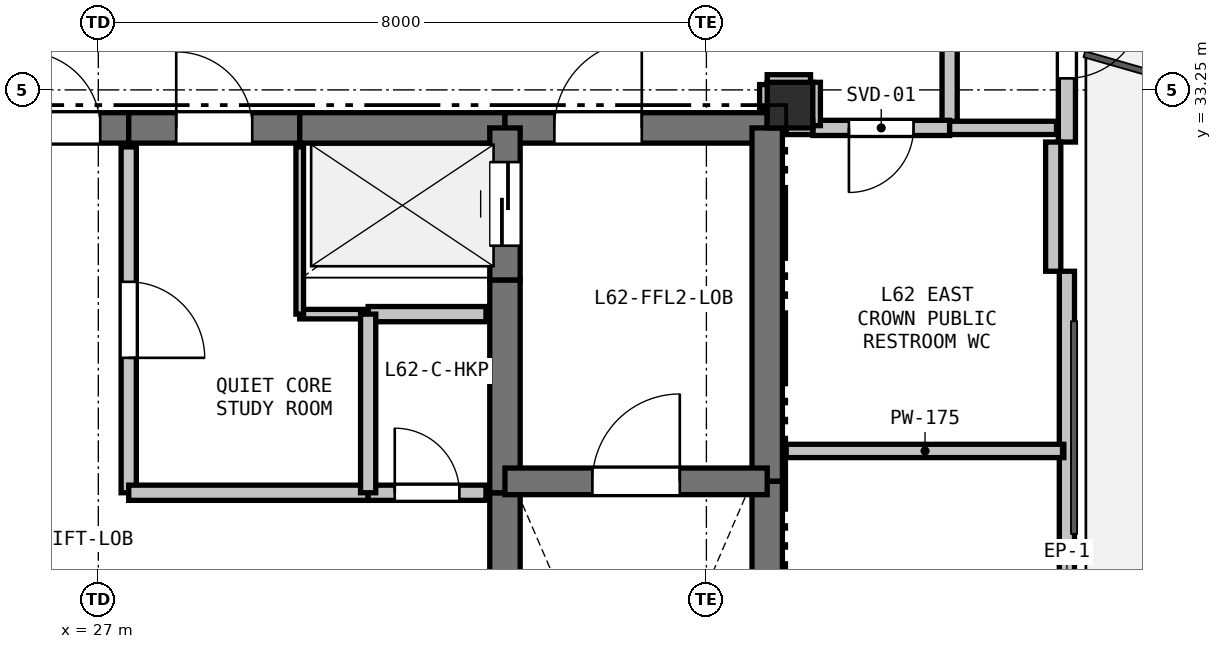
"""IFC4 building model, lengths in metres.
Left out: names, types, materials, properties, quantities, classifications, styles, units other than length and angle.
Written with IfcOpenShell. Run it as: python <this file> out.ifc"""

import sys

from ifc_helpers import new_model, si_unit, direction, frame, frame_2d, origin, origin_2d, place, context, subcontext, project, spatial, rectangle, extrude, element, fill, save


model = new_model("IFC4")
c1 = context("Model", 3, precision=1e-05, world=origin(), true_north=direction((0.0, 1.0)))
c2 = subcontext(c1, "Body", "Model", "MODEL_VIEW")
j1 = project(units=[si_unit("LENGTHUNIT", "METRE"), si_unit("PLANEANGLEUNIT", "RADIAN")], contexts=[c1])
p1 = place(None, origin())
s1 = spatial("IfcSite", under=j1, at=p1, CompositionType="ELEMENT")
p2 = place(p1, origin())
s2 = spatial("IfcBuilding", under=s1, at=p2, CompositionType="ELEMENT")
p3 = place(p2, frame((0.0, 0.0, 223.2)))
s3 = spatial("IfcBuildingStorey", under=s2, at=p3, CompositionType="ELEMENT", Elevation=223.2)
p4 = place(p3, frame((36.1, 33.05, 0.0), z_axis=(0.0, 0.0, 1.0), x_axis=(1.0, 0.0, 0.0)))
e1 = element("IfcColumn", 1, at=p4, inside=s3, PredefinedType="COLUMN", context=c2, shape_type="SweptSolid", body=[
    extrude(rectangle(XDim=0.6, YDim=0.6, at=origin_2d()), origin(), (0.0, 0.0, 1.0), 3.3),
])
p5 = place(p3, frame((39.743, 41.492, 0.0), z_axis=(0.0, 0.0, 1.0), x_axis=(0.0, -1.0, 0.0)))
e2 = element("IfcWall", 2, at=p5, inside=s3, PredefinedType="SOLIDWALL", context=c2, shape_type="SweptSolid", body=[
    extrude(rectangle(XDim=8.928, YDim=0.225, at=frame_2d((4.464, 0.0))), origin(), (0.0, 0.0, 1.0), 2.7),
])
p6 = place(p5, frame((7.09, 0.0, 0.0)))
e3 = element("IfcOpeningElement", 3, at=p6, cuts=e2, PredefinedType="OPENING", context=c2, shape_type="SweptSolid", body=[
    extrude(rectangle(XDim=1.0, YDim=2.1, at=frame_2d((0.5, 1.05))), frame((0.0, 0.123, 0.0), z_axis=(0.0, -1.0, 0.0), x_axis=(1.0, 0.0, 0.0)), (0.0, 0.0, 1.0), 0.245),
])
p7 = place(p5, frame((1.406, 0.0, 0.9)))
e4 = element("IfcOpeningElement", 4, at=p7, cuts=e2, PredefinedType="OPENING", context=c2, shape_type="SweptSolid", body=[
    extrude(rectangle(XDim=1.2, YDim=1.4, at=frame_2d((0.6, 0.7))), frame((0.0, 0.123, 0.0), z_axis=(0.0, -1.0, 0.0), x_axis=(1.0, 0.0, 0.0)), (0.0, 0.0, 1.0), 0.245),
])
p8 = place(p3, frame((39.743, 30.864, 0.0), z_axis=(0.0, 0.0, 1.0), x_axis=(0.0, -1.0, 0.0)))
e5 = element("IfcWall", 5, at=p8, inside=s3, PredefinedType="PARAPET", context=c2, shape_type="SweptSolid", body=[
    extrude(rectangle(XDim=8.228, YDim=0.2, at=frame_2d((4.114, 0.0))), origin(), (0.0, 0.0, 1.0), 0.2),
])
p9 = place(p3, frame((39.563, 32.564, 0.0), z_axis=(0.0, 0.0, 1.0), x_axis=(0.0, -1.0, 0.0)))
e6 = element("IfcWall", 6, at=p9, inside=s3, PredefinedType="PARAPET", context=c2, shape_type="SweptSolid", body=[
    extrude(rectangle(XDim=1.7, YDim=0.2, at=frame_2d((0.85, 0.0))), origin(), (0.0, 0.0, 1.0), 2.7),
])
p10 = place(p3, frame((25.65, 32.75, 0.0), z_axis=(0.0, 0.0, 1.0), x_axis=(1.0, 0.0, 0.0)))
e7 = element("IfcWall", 7, at=p10, inside=s3, PredefinedType="SHEAR", context=c2, shape_type="SweptSolid", body=[
    extrude(rectangle(XDim=1.75, YDim=0.4, at=frame_2d((0.875, 0.0))), origin(), (0.0, 0.0, 1.0), 3.08),
])
p11 = place(p10, frame((0.375, 0.0, 0.0)))
e8 = element("IfcOpeningElement", 8, at=p11, cuts=e7, PredefinedType="OPENING", context=c2, shape_type="SweptSolid", body=[
    extrude(rectangle(XDim=1.0, YDim=2.15, at=frame_2d((0.5, 1.075))), frame((0.0, 0.21, 0.0), z_axis=(0.0, -1.0, 0.0), x_axis=(1.0, 0.0, 0.0)), (0.0, 0.0, 1.0), 0.42),
])
p12 = place(p3, frame((27.4, 32.75, 0.0), z_axis=(0.0, 0.0, 1.0), x_axis=(1.0, 0.0, 0.0)))
e9 = element("IfcWall", 9, at=p12, inside=s3, PredefinedType="SHEAR", context=c2, shape_type="SweptSolid", body=[
    extrude(rectangle(XDim=2.25, YDim=0.4, at=frame_2d((1.125, 0.0))), origin(), (0.0, 0.0, 1.0), 3.08),
])
p13 = place(p12, frame((0.625, 0.0, 0.0)))
e10 = element("IfcOpeningElement", 10, at=p13, cuts=e9, PredefinedType="OPENING", context=c2, shape_type="SweptSolid", body=[
    extrude(rectangle(XDim=1.0, YDim=2.15, at=frame_2d((0.5, 1.075))), frame((0.0, 0.21, 0.0), z_axis=(0.0, -1.0, 0.0), x_axis=(1.0, 0.0, 0.0)), (0.0, 0.0, 1.0), 0.42),
])
p14 = place(p3, frame((29.65, 32.75, 0.0), z_axis=(0.0, 0.0, 1.0), x_axis=(1.0, 0.0, 0.0)))
e11 = element("IfcWall", 11, at=p14, inside=s3, PredefinedType="SHEAR", context=c2, shape_type="SweptSolid", body=[
    extrude(rectangle(XDim=2.7, YDim=0.4, at=frame_2d((1.35, 0.0))), origin(), (0.0, 0.0, 1.0), 3.08),
])
p15 = place(p3, frame((32.35, 32.75, 0.0), z_axis=(0.0, 0.0, 1.0), x_axis=(1.0, 0.0, 0.0)))
e12 = element("IfcWall", 12, at=p15, inside=s3, PredefinedType="SHEAR", context=c2, shape_type="SweptSolid", body=[
    extrude(rectangle(XDim=3.45, YDim=0.4, at=frame_2d((1.725, 0.0))), origin(), (0.0, 0.0, 1.0), 3.08),
])
p16 = place(p15, frame((0.65, 0.0, 0.0)))
e13 = element("IfcOpeningElement", 13, at=p16, cuts=e12, PredefinedType="OPENING", context=c2, shape_type="SweptSolid", body=[
    extrude(rectangle(XDim=1.15, YDim=2.15, at=frame_2d((0.575, 1.075))), frame((0.0, 0.21, 0.0), z_axis=(0.0, -1.0, 0.0), x_axis=(1.0, 0.0, 0.0)), (0.0, 0.0, 1.0), 0.42),
])
p17 = place(p3, frame((35.8, 32.75, 0.0), z_axis=(0.0, 0.0, 1.0), x_axis=(0.0, -1.0, 0.0)))
e14 = element("IfcWall", 14, at=p17, inside=s3, PredefinedType="SHEAR", context=c2, shape_type="SweptSolid", body=[
    extrude(rectangle(XDim=4.65, YDim=0.4, at=frame_2d((2.325, 0.0))), origin(), (0.0, 0.0, 1.0), 3.08),
])
p18 = place(p3, frame((35.8, 28.1, 0.0), z_axis=(0.0, 0.0, 1.0), x_axis=(0.0, -1.0, 0.0)))
e15 = element("IfcWall", 15, at=p18, inside=s3, PredefinedType="SHEAR", context=c2, shape_type="SweptSolid", body=[
    extrude(rectangle(XDim=7.35, YDim=0.4, at=frame_2d((3.675, 0.0))), origin(), (0.0, 0.0, 1.0), 3.08),
])
p19 = place(p3, frame((32.35, 25.55, 0.0), z_axis=(0.0, 0.0, 1.0), x_axis=(0.0, 1.0, 0.0)))
e16 = element("IfcWall", 16, at=p19, inside=s3, PredefinedType="SHEAR", context=c2, shape_type="SweptSolid", body=[
    extrude(rectangle(XDim=2.4, YDim=0.4, at=frame_2d((1.2, 0.0))), origin(), (0.0, 0.0, 1.0), 3.08),
])
p20 = place(p3, frame((32.35, 27.95, 0.0), z_axis=(0.0, 0.0, 1.0), x_axis=(0.0, 1.0, 0.0)))
e17 = element("IfcWall", 17, at=p20, inside=s3, PredefinedType="SHEAR", context=c2, shape_type="SweptSolid", body=[
    extrude(rectangle(XDim=2.8, YDim=0.4, at=frame_2d((1.4, 0.0))), origin(), (0.0, 0.0, 1.0), 3.08),
])
p21 = place(p3, frame((32.35, 30.75, 0.0), z_axis=(0.0, 0.0, 1.0), x_axis=(0.0, 1.0, 0.0)))
e18 = element("IfcWall", 18, at=p21, inside=s3, PredefinedType="SHEAR", context=c2, shape_type="SweptSolid", body=[
    extrude(rectangle(XDim=2.0, YDim=0.4, at=frame_2d((1.0, 0.0))), origin(), (0.0, 0.0, 1.0), 3.08),
])
p22 = place(p21, frame((0.45, 0.0, 0.0)))
e19 = element("IfcOpeningElement", 19, at=p22, cuts=e18, PredefinedType="OPENING", context=c2, shape_type="SweptSolid", body=[
    extrude(rectangle(XDim=1.1, YDim=2.15, at=frame_2d((0.55, 1.075))), frame((0.0, 0.21, 0.0), z_axis=(0.0, -1.0, 0.0), x_axis=(1.0, 0.0, 0.0)), (0.0, 0.0, 1.0), 0.42),
])
p23 = place(p3, frame((32.35, 28.1, 0.0), z_axis=(0.0, 0.0, 1.0), x_axis=(1.0, 0.0, 0.0)))
e20 = element("IfcWall", 20, at=p23, inside=s3, PredefinedType="SHEAR", context=c2, shape_type="SweptSolid", body=[
    extrude(rectangle(XDim=3.45, YDim=0.35, at=frame_2d((1.725, 0.0))), origin(), (0.0, 0.0, 1.0), 3.08),
])
p24 = place(p23, frame((1.15, 0.0, 0.0)))
e21 = element("IfcOpeningElement", 21, at=p24, cuts=e20, PredefinedType="OPENING", context=c2, shape_type="SweptSolid", body=[
    extrude(rectangle(XDim=1.15, YDim=2.15, at=frame_2d((0.575, 1.075))), frame((0.0, 0.185, 0.0), z_axis=(0.0, -1.0, 0.0), x_axis=(1.0, 0.0, 0.0)), (0.0, 0.0, 1.0), 0.37),
])
p25 = place(p3, frame((32.1, 30.3, 0.0), z_axis=(0.0, 0.0, 1.0), x_axis=(-1.0, 0.0, 0.0)))
e22 = element("IfcWall", 22, at=p25, inside=s3, PredefinedType="PARTITIONING", context=c2, shape_type="SweptSolid", body=[
    extrude(rectangle(XDim=1.55, YDim=0.2, at=frame_2d((0.775, 0.0))), origin(), (0.0, 0.0, 1.0), 3.08),
])
p26 = place(p3, frame((30.55, 30.3, 0.0), z_axis=(0.0, 0.0, 1.0), x_axis=(-1.0, 0.0, 0.0)))
e23 = element("IfcWall", 23, at=p26, inside=s3, PredefinedType="PARTITIONING", context=c2, shape_type="SweptSolid", body=[
    extrude(rectangle(XDim=0.9, YDim=0.125, at=frame_2d((0.45, 0.0))), origin(), (0.0, 0.0, 1.0), 3.08),
])
p27 = place(p3, frame((29.65, 30.3, 0.0), z_axis=(0.0, 0.0, 1.0), x_axis=(0.0, 1.0, 0.0)))
e24 = element("IfcWall", 24, at=p27, inside=s3, PredefinedType="PARTITIONING", context=c2, shape_type="SweptSolid", body=[
    extrude(rectangle(XDim=2.2, YDim=0.1, at=frame_2d((1.1, 0.0))), origin(), (0.0, 0.0, 1.0), 3.08),
])
p28 = place(p3, frame((27.4, 32.5, 0.0), z_axis=(0.0, 0.0, 1.0), x_axis=(0.0, -1.0, 0.0)))
e25 = element("IfcWall", 25, at=p28, inside=s3, PredefinedType="PARTITIONING", context=c2, shape_type="SweptSolid", body=[
    extrude(rectangle(XDim=4.55, YDim=0.2, at=frame_2d((2.275, 0.0))), origin(), (0.0, 0.0, 1.0), 3.08),
])
p29 = place(p28, frame((1.775, 0.0, 0.0)))
e26 = element("IfcOpeningElement", 26, at=p29, cuts=e25, PredefinedType="OPENING", context=c2, shape_type="SweptSolid", body=[
    extrude(rectangle(XDim=1.0, YDim=2.15, at=frame_2d((0.5, 1.075))), frame((0.0, 0.11, 0.0), z_axis=(0.0, -1.0, 0.0), x_axis=(1.0, 0.0, 0.0)), (0.0, 0.0, 1.0), 0.22),
])
p30 = place(p3, frame((27.4, 27.95, 0.0), z_axis=(0.0, 0.0, 1.0), x_axis=(1.0, 0.0, 0.0)))
e27 = element("IfcWall", 27, at=p30, inside=s3, PredefinedType="PARTITIONING", context=c2, shape_type="SweptSolid", body=[
    extrude(rectangle(XDim=3.15, YDim=0.2, at=frame_2d((1.575, 0.0))), origin(), (0.0, 0.0, 1.0), 3.08),
])
p31 = place(p3, frame((30.55, 27.95, 0.0), z_axis=(0.0, 0.0, 1.0), x_axis=(1.0, 0.0, 0.0)))
e28 = element("IfcWall", 28, at=p31, inside=s3, PredefinedType="PARTITIONING", context=c2, shape_type="SweptSolid", body=[
    extrude(rectangle(XDim=1.55, YDim=0.2, at=frame_2d((0.775, 0.0))), origin(), (0.0, 0.0, 1.0), 3.08),
])
p32 = place(p31, frame((0.35, 0.0, 0.0)))
e29 = element("IfcOpeningElement", 29, at=p32, cuts=e28, PredefinedType="OPENING", context=c2, shape_type="SweptSolid", body=[
    extrude(rectangle(XDim=0.85, YDim=2.1, at=frame_2d((0.425, 1.05))), frame((0.0, 0.11, 0.0), z_axis=(0.0, -1.0, 0.0), x_axis=(1.0, 0.0, 0.0)), (0.0, 0.0, 1.0), 0.22),
])
p33 = place(p3, frame((38.2, 35.2, 0.0), z_axis=(0.0, 0.0, 1.0), x_axis=(0.0, -1.0, 0.0)))
e30 = element("IfcWall", 30, at=p33, inside=s3, PredefinedType="PARTITIONING", context=c2, shape_type="SweptSolid", body=[
    extrude(rectangle(XDim=2.45, YDim=0.2, at=frame_2d((1.225, 0.0))), origin(), (0.0, 0.0, 1.0), 3.08),
])
p34 = place(p3, frame((38.2, 32.75, 0.0), z_axis=(0.0, 0.0, 1.0), x_axis=(-1.0, 0.0, 0.0)))
e31 = element("IfcWall", 31, at=p34, inside=s3, PredefinedType="PARTITIONING", context=c2, shape_type="SweptSolid", body=[
    extrude(rectangle(XDim=1.8, YDim=0.2, at=frame_2d((0.9, 0.0))), origin(), (0.0, 0.0, 1.0), 3.08),
])
p35 = place(p34, frame((0.475, 0.0, 0.0)))
e32 = element("IfcOpeningElement", 32, at=p35, cuts=e31, PredefinedType="OPENING", context=c2, shape_type="SweptSolid", body=[
    extrude(rectangle(XDim=0.85, YDim=2.1, at=frame_2d((0.425, 1.05))), frame((0.0, 0.11, 0.0), z_axis=(0.0, -1.0, 0.0), x_axis=(1.0, 0.0, 0.0)), (0.0, 0.0, 1.0), 0.22),
])
for number, where, z_axis, x_axis in (
    (33, (36.4, 32.78, 0.0), (0.0, 0.0, 1.0), (0.0, 1.0, 0.0)),
    (34, (36.37, 33.35, 0.0), (0.0, 0.0, 1.0), (-1.0, 0.0, 0.0)),
):
    element("IfcWall", number, at=place(p3, frame(where, z_axis=z_axis, x_axis=x_axis)), inside=s3, PredefinedType="PARTITIONING", context=c2, shape_type="SweptSolid", body=[
        extrude(rectangle(XDim=0.57, YDim=0.2, at=frame_2d((0.285, 0.0))), origin(), (0.0, 0.0, 1.0), 2.528),
    ])
p36 = place(p3, frame((35.8, 33.32, 0.0), z_axis=(0.0, 0.0, 1.0), x_axis=(0.0, -1.0, 0.0)))
e35 = element("IfcWall", 35, at=p36, inside=s3, PredefinedType="PARTITIONING", context=c2, shape_type="SweptSolid", body=[
    extrude(rectangle(XDim=0.32, YDim=0.2, at=frame_2d((0.16, 0.0))), origin(), (0.0, 0.0, 1.0), 2.605),
])
p37 = place(p3, frame((36.05, 32.75, 0.0), z_axis=(0.0, 0.0, 1.0), x_axis=(1.0, 0.0, 0.0)))
e36 = element("IfcWall", 36, at=p37, inside=s3, PredefinedType="PLUMBINGWALL", context=c2, shape_type="SweptSolid", body=[
    extrude(rectangle(XDim=0.35, YDim=0.175, at=frame_2d((0.175, 0.0))), origin(), (0.0, 0.0, 1.0), 2.605),
])
p38 = place(p3, frame((38.2, 32.75, 0.0), z_axis=(0.0, 0.0, 1.0), x_axis=(1.0, 0.0, 0.0)))
e37 = element("IfcWall", 37, at=p38, inside=s3, PredefinedType="PLUMBINGWALL", context=c2, shape_type="SweptSolid", body=[
    extrude(rectangle(XDim=1.406, YDim=0.175, at=frame_2d((0.703, 0.0))), origin(), (0.0, 0.0, 1.0), 2.365),
])
p39 = place(p3, frame((39.703, 28.5, 0.0), z_axis=(0.0, 0.0, 1.0), x_axis=(-1.0, 0.0, 0.0)))
e38 = element("IfcWall", 38, at=p39, inside=s3, PredefinedType="PLUMBINGWALL", context=c2, shape_type="SweptSolid", body=[
    extrude(rectangle(XDim=3.653, YDim=0.175, at=frame_2d((1.826, 0.0))), origin(), (0.0, 0.0, 1.0), 2.365),
])
p40 = place(p3, frame((30.55, 30.3, 0.0), z_axis=(0.0, 0.0, 1.0), x_axis=(0.0, -1.0, 0.0)))
e39 = element("IfcWall", 39, at=p40, inside=s3, PredefinedType="PARTITIONING", context=c2, shape_type="SweptSolid", body=[
    extrude(rectangle(XDim=2.35, YDim=0.2, at=frame_2d((1.175, 0.0))), origin(), (0.0, 0.0, 1.0), 3.08),
])
p41 = place(p6, origin())
e40 = element("IfcDoor", 40, at=p41, inside=s3, OperationType="SINGLE_SWING_LEFT", PredefinedType="DOOR", context=c2, shape_type="SweptSolid", body=[
    extrude(rectangle(XDim=1.0, YDim=2.1, at=frame_2d((0.5, 1.05))), frame((0.0, 0.025, 0.0), z_axis=(0.0, -1.0, 0.0), x_axis=(1.0, 0.0, 0.0)), (0.0, 0.0, 1.0), 0.05),
])
fill(e3, e40)
p42 = place(p11, origin())
e41 = element("IfcDoor", 41, at=p42, inside=s3, OperationType="SINGLE_SWING_LEFT", PredefinedType="DOOR", context=c2, shape_type="SweptSolid", body=[
    extrude(rectangle(XDim=1.0, YDim=2.15, at=frame_2d((0.5, 1.075))), frame((0.0, 0.025, 0.0), z_axis=(0.0, -1.0, 0.0), x_axis=(1.0, 0.0, 0.0)), (0.0, 0.0, 1.0), 0.05),
])
fill(e8, e41)
p43 = place(p22, origin())
e42 = element("IfcDoor", 42, at=p43, inside=s3, OperationType="SLIDING_TO_LEFT", PredefinedType="DOOR", context=c2, shape_type="SweptSolid", body=[
    extrude(rectangle(XDim=1.1, YDim=2.15, at=frame_2d((0.55, 1.075))), frame((0.0, 0.025, 0.0), z_axis=(0.0, -1.0, 0.0), x_axis=(1.0, 0.0, 0.0)), (0.0, 0.0, 1.0), 0.05),
])
fill(e19, e42)
p44 = place(p24, origin())
e43 = element("IfcDoor", 43, at=p44, inside=s3, OperationType="SINGLE_SWING_RIGHT", PredefinedType="DOOR", context=c2, shape_type="SweptSolid", body=[
    extrude(rectangle(XDim=1.15, YDim=2.15, at=frame_2d((0.575, 1.075))), frame((0.0, 0.025, 0.0), z_axis=(0.0, -1.0, 0.0), x_axis=(1.0, 0.0, 0.0)), (0.0, 0.0, 1.0), 0.05),
])
fill(e21, e43)
p45 = place(p16, origin())
e44 = element("IfcDoor", 44, at=p45, inside=s3, OperationType="SINGLE_SWING_RIGHT", PredefinedType="DOOR", context=c2, shape_type="SweptSolid", body=[
    extrude(rectangle(XDim=1.15, YDim=2.15, at=frame_2d((0.575, 1.075))), frame((0.0, 0.025, 0.0), z_axis=(0.0, -1.0, 0.0), x_axis=(1.0, 0.0, 0.0)), (0.0, 0.0, 1.0), 0.05),
])
fill(e13, e44)
p46 = place(p29, origin())
e45 = element("IfcDoor", 45, at=p46, inside=s3, OperationType="SINGLE_SWING_RIGHT", PredefinedType="DOOR", context=c2, shape_type="SweptSolid", body=[
    extrude(rectangle(XDim=1.0, YDim=2.15, at=frame_2d((0.5, 1.075))), frame((0.0, 0.025, 0.0), z_axis=(0.0, -1.0, 0.0), x_axis=(1.0, 0.0, 0.0)), (0.0, 0.0, 1.0), 0.05),
])
fill(e26, e45)
p47 = place(p32, origin())
e46 = element("IfcDoor", 46, at=p47, inside=s3, OperationType="SINGLE_SWING_LEFT", PredefinedType="DOOR", context=c2, shape_type="SweptSolid", body=[
    extrude(rectangle(XDim=0.85, YDim=2.1, at=frame_2d((0.425, 1.05))), frame((0.0, 0.025, 0.0), z_axis=(0.0, -1.0, 0.0), x_axis=(1.0, 0.0, 0.0)), (0.0, 0.0, 1.0), 0.05),
])
fill(e29, e46)
p48 = place(p35, origin())
e47 = element("IfcDoor", 47, at=p48, inside=s3, OperationType="SINGLE_SWING_RIGHT", PredefinedType="DOOR", context=c2, shape_type="SweptSolid", body=[
    extrude(rectangle(XDim=0.85, YDim=2.1, at=frame_2d((0.425, 1.05))), frame((0.0, 0.025, 0.0), z_axis=(0.0, -1.0, 0.0), x_axis=(1.0, 0.0, 0.0)), (0.0, 0.0, 1.0), 0.05),
])
fill(e32, e47)
p49 = place(p13, origin())
e48 = element("IfcDoor", 48, at=p49, inside=s3, OperationType="SINGLE_SWING_LEFT", PredefinedType="DOOR", context=c2, shape_type="SweptSolid", body=[
    extrude(rectangle(XDim=1.0, YDim=2.15, at=frame_2d((0.5, 1.075))), frame((0.0, 0.025, 0.0), z_axis=(0.0, -1.0, 0.0), x_axis=(1.0, 0.0, 0.0)), (0.0, 0.0, 1.0), 0.05),
])
fill(e10, e48)
save(model, sys.argv[1])
